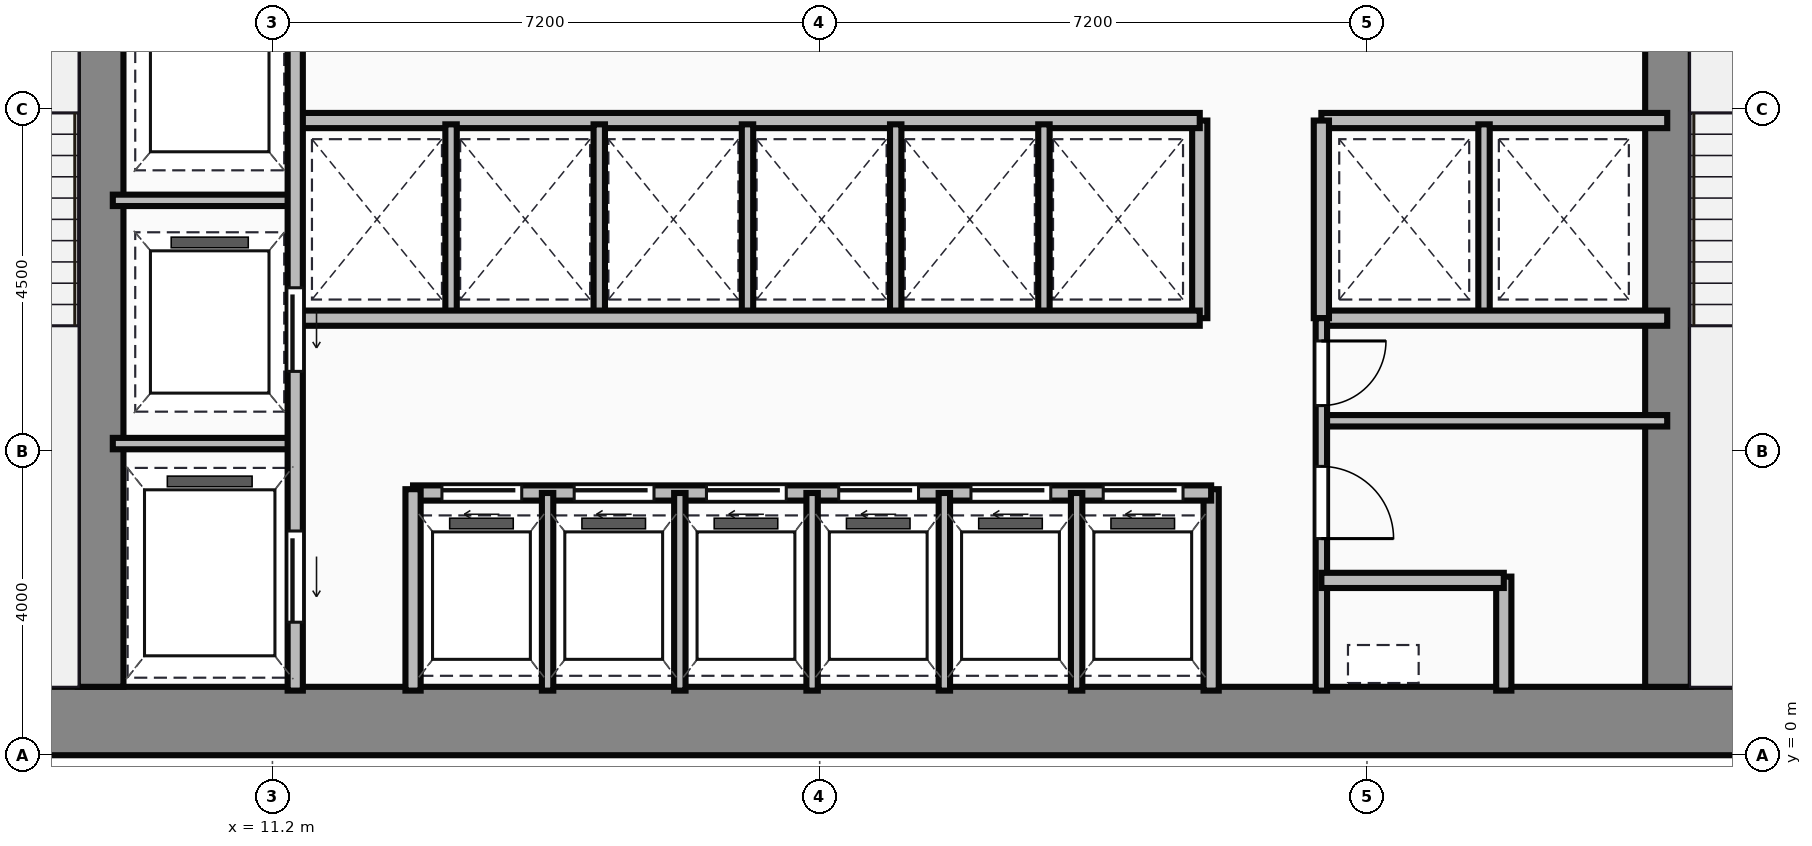
"""IFC4 building model, lengths in metres.
Left out: names, types, materials, properties, quantities, classifications, styles, units other than length and angle.
Written with IfcOpenShell. Run it as: python <this file> out.ifc"""

import sys

from ifc_helpers import new_model, si_unit, direction, frame, frame_2d, origin, place, context, subcontext, project, spatial, rectangle, extrude, source, transform, mapped, element, fill, save


model = new_model("IFC4")
c1 = context("Model", 3, precision=1e-05, world=origin(), true_north=direction((0.0, 1.0)))
c2 = subcontext(c1, "Body", "Model", "MODEL_VIEW")
j1 = project(units=[si_unit("LENGTHUNIT", "METRE"), si_unit("PLANEANGLEUNIT", "RADIAN")], contexts=[c1])
p1 = place(None, origin())
s1 = spatial("IfcSite", under=j1, at=p1, CompositionType="ELEMENT")
p2 = place(p1, origin())
s2 = spatial("IfcBuilding", under=s1, at=p2, CompositionType="ELEMENT")
p3 = place(p2, frame((0.0, 0.0, 43.45)))
s3 = spatial("IfcBuildingStorey", under=s2, at=p3, CompositionType="ELEMENT", Elevation=43.45)
m1 = source(origin(), c2, "Body", "SweptSolid", [
    extrude(rectangle(XDim=29.5, YDim=0.9, at=frame_2d((14.75, 0.0))), origin(), (0.0, 0.0, 1.0), 3.65),
])
p4 = place(p3, frame((4.5, 0.45, 0.0), z_axis=(0.0, 0.0, 1.0), x_axis=(1.0, 0.0, 0.0)))
e1 = element("IfcWall", 1, at=p4, inside=s3, PredefinedType="SHEAR", context=c2, shape_type="MappedRepresentation", body=[
    mapped(m1, transform((0.0, 0.0, 0.0))),
])
m2 = source(origin(), c2, "Body", "SweptSolid", [
    extrude(rectangle(XDim=12.2, YDim=0.6, at=frame_2d((6.1, 0.0))), origin(), (0.0, 0.0, 1.0), 3.65),
])
for number, where, z_axis, x_axis in (
    (2, (8.94, 0.9, 0.0), (0.0, 0.0, 1.0), (0.0, 1.0, 0.0)),
    (3, (29.56, 0.9, 0.0), (0.0, 0.0, 1.0), (0.0, 1.0, 0.0)),
):
    element("IfcWall", number, at=place(p3, frame(where, z_axis=z_axis, x_axis=x_axis)), inside=s3, PredefinedType="SHEAR", context=c2, shape_type="MappedRepresentation", body=[
        mapped(m2, transform((0.0, 0.0, 0.0))),
    ])
m3 = source(origin(), c2, "Body", "SweptSolid", [
    extrude(rectangle(XDim=9.6, YDim=0.2, at=frame_2d((4.8, 0.0))), origin(), (0.0, 0.0, 1.0), 3.4),
])
p5 = place(p3, frame((11.5, 0.85, 0.0), z_axis=(0.0, 0.0, 1.0), x_axis=(0.0, 1.0, 0.0)))
e4 = element("IfcWall", 4, at=p5, inside=s3, PredefinedType="PARTITIONING", context=c2, shape_type="MappedRepresentation", body=[
    mapped(m3, transform((0.0, 0.0, 0.0))),
])
p6 = place(p5, frame((4.2, 0.0, 0.0)))
e5 = element("IfcOpeningElement", 5, at=p6, cuts=e4, PredefinedType="OPENING", context=c2, shape_type="SweptSolid", body=[
    extrude(rectangle(XDim=1.1, YDim=2.15, at=frame_2d((0.55, 1.075))), frame((0.0, 0.11, 0.0), z_axis=(0.0, -1.0, 0.0), x_axis=(1.0, 0.0, 0.0)), (0.0, 0.0, 1.0), 0.22),
])
p7 = place(p5, frame((0.9, 0.0, 0.0)))
e6 = element("IfcOpeningElement", 6, at=p7, cuts=e4, PredefinedType="OPENING", context=c2, shape_type="SweptSolid", body=[
    extrude(rectangle(XDim=1.2, YDim=2.15, at=frame_2d((0.6, 1.075))), frame((0.0, 0.11, 0.0), z_axis=(0.0, -1.0, 0.0), x_axis=(1.0, 0.0, 0.0)), (0.0, 0.0, 1.0), 0.22),
])
m4 = source(origin(), c2, "Body", "SweptSolid", [
    extrude(rectangle(XDim=2.4, YDim=0.15, at=frame_2d((1.2, 0.0))), origin(), (0.0, 0.0, 1.0), 3.4),
])
for number, where, z_axis, x_axis in (
    (7, (9.1, 4.1, 0.0), (0.0, 0.0, 1.0), (1.0, 0.0, 0.0)),
    (8, (9.1, 7.3, 0.0), (0.0, 0.0, 1.0), (1.0, 0.0, 0.0)),
):
    element("IfcWall", number, at=place(p3, frame(where, z_axis=z_axis, x_axis=x_axis)), inside=s3, PredefinedType="PARTITIONING", context=c2, shape_type="MappedRepresentation", body=[
        mapped(m4, transform((0.0, 0.0, 0.0))),
    ])
m5 = source(origin(), c2, "Body", "SweptSolid", [
    extrude(rectangle(XDim=2.65, YDim=0.2, at=frame_2d((1.325, 0.0))), origin(), (0.0, 0.0, 1.0), 3.4),
])
p8 = place(p3, frame((13.05, 0.85, 0.0), z_axis=(0.0, 0.0, 1.0), x_axis=(0.0, 1.0, 0.0)))
e9 = element("IfcWall", 9, at=p8, inside=s3, PredefinedType="PARTITIONING", context=c2, shape_type="MappedRepresentation", body=[
    mapped(m5, transform((0.0, 0.0, 0.0))),
])
m6 = source(origin(), c2, "Body", "SweptSolid", [
    extrude(rectangle(XDim=10.5, YDim=0.2, at=frame_2d((5.25, 0.0))), origin(), (0.0, 0.0, 1.0), 3.4),
])
p9 = place(p3, frame((13.05, 3.45, 0.0), z_axis=(0.0, 0.0, 1.0), x_axis=(1.0, 0.0, 0.0)))
e10 = element("IfcWall", 10, at=p9, inside=s3, PredefinedType="PARTITIONING", context=c2, shape_type="MappedRepresentation", body=[
    mapped(m6, transform((0.0, 0.0, 0.0))),
])
p10 = place(p9, frame((0.38, 0.0, 0.0)))
e11 = element("IfcOpeningElement", 11, at=p10, cuts=e10, PredefinedType="OPENING", context=c2, shape_type="SweptSolid", body=[
    extrude(rectangle(XDim=1.05, YDim=2.15, at=frame_2d((0.525, 1.075))), frame((0.0, 0.11, 0.0), z_axis=(0.0, -1.0, 0.0), x_axis=(1.0, 0.0, 0.0)), (0.0, 0.0, 1.0), 0.22),
])
p11 = place(p9, frame((2.12, 0.0, 0.0)))
e12 = element("IfcOpeningElement", 12, at=p11, cuts=e10, PredefinedType="OPENING", context=c2, shape_type="SweptSolid", body=[
    extrude(rectangle(XDim=1.05, YDim=2.15, at=frame_2d((0.525, 1.075))), frame((0.0, 0.11, 0.0), z_axis=(0.0, -1.0, 0.0), x_axis=(1.0, 0.0, 0.0)), (0.0, 0.0, 1.0), 0.22),
])
p12 = place(p9, frame((3.86, 0.0, 0.0)))
e13 = element("IfcOpeningElement", 13, at=p12, cuts=e10, PredefinedType="OPENING", context=c2, shape_type="SweptSolid", body=[
    extrude(rectangle(XDim=1.05, YDim=2.15, at=frame_2d((0.525, 1.075))), frame((0.0, 0.11, 0.0), z_axis=(0.0, -1.0, 0.0), x_axis=(1.0, 0.0, 0.0)), (0.0, 0.0, 1.0), 0.22),
])
p13 = place(p9, frame((5.6, 0.0, 0.0)))
e14 = element("IfcOpeningElement", 14, at=p13, cuts=e10, PredefinedType="OPENING", context=c2, shape_type="SweptSolid", body=[
    extrude(rectangle(XDim=1.05, YDim=2.15, at=frame_2d((0.525, 1.075))), frame((0.0, 0.11, 0.0), z_axis=(0.0, -1.0, 0.0), x_axis=(1.0, 0.0, 0.0)), (0.0, 0.0, 1.0), 0.22),
])
p14 = place(p9, frame((7.34, 0.0, 0.0)))
e15 = element("IfcOpeningElement", 15, at=p14, cuts=e10, PredefinedType="OPENING", context=c2, shape_type="SweptSolid", body=[
    extrude(rectangle(XDim=1.05, YDim=2.15, at=frame_2d((0.525, 1.075))), frame((0.0, 0.11, 0.0), z_axis=(0.0, -1.0, 0.0), x_axis=(1.0, 0.0, 0.0)), (0.0, 0.0, 1.0), 0.22),
])
p15 = place(p9, frame((9.08, 0.0, 0.0)))
e16 = element("IfcOpeningElement", 16, at=p15, cuts=e10, PredefinedType="OPENING", context=c2, shape_type="SweptSolid", body=[
    extrude(rectangle(XDim=1.05, YDim=2.15, at=frame_2d((0.525, 1.075))), frame((0.0, 0.11, 0.0), z_axis=(0.0, -1.0, 0.0), x_axis=(1.0, 0.0, 0.0)), (0.0, 0.0, 1.0), 0.22),
])
p16 = place(p3, frame((23.55, 0.85, 0.0), z_axis=(0.0, 0.0, 1.0), x_axis=(0.0, 1.0, 0.0)))
e17 = element("IfcWall", 17, at=p16, inside=s3, PredefinedType="PARTITIONING", context=c2, shape_type="MappedRepresentation", body=[
    mapped(m5, transform((0.0, 0.0, 0.0))),
])
m7 = source(origin(), c2, "Body", "SweptSolid", [
    extrude(rectangle(XDim=2.6, YDim=0.15, at=frame_2d((1.3, 0.0))), origin(), (0.0, 0.0, 1.0), 3.4),
])
for number, where, z_axis, x_axis in (
    (18, (14.82, 0.85, 0.0), (0.0, 0.0, 1.0), (0.0, 1.0, 0.0)),
    (19, (16.56, 0.85, 0.0), (0.0, 0.0, 1.0), (0.0, 1.0, 0.0)),
    (20, (18.3, 0.85, 0.0), (0.0, 0.0, 1.0), (0.0, 1.0, 0.0)),
    (21, (20.04, 0.85, 0.0), (0.0, 0.0, 1.0), (0.0, 1.0, 0.0)),
    (22, (21.78, 0.85, 0.0), (0.0, 0.0, 1.0), (0.0, 1.0, 0.0)),
):
    element("IfcWall", number, at=place(p3, frame(where, z_axis=z_axis, x_axis=x_axis)), inside=s3, PredefinedType="PARTITIONING", context=c2, shape_type="MappedRepresentation", body=[
        mapped(m7, transform((0.0, 0.0, 0.0))),
    ])
m8 = source(origin(), c2, "Body", "SweptSolid", [
    extrude(rectangle(XDim=11.85, YDim=0.2, at=frame_2d((5.925, 0.0))), origin(), (0.0, 0.0, 1.0), 3.4),
])
for number, where, z_axis, x_axis in (
    (23, (11.55, 5.75, 0.0), (0.0, 0.0, 1.0), (1.0, 0.0, 0.0)),
    (24, (11.55, 8.35, 0.0), (0.0, 0.0, 1.0), (1.0, 0.0, 0.0)),
):
    element("IfcWall", number, at=place(p3, frame(where, z_axis=z_axis, x_axis=x_axis)), inside=s3, PredefinedType="PARTITIONING", context=c2, shape_type="MappedRepresentation", body=[
        mapped(m8, transform((0.0, 0.0, 0.0))),
    ])
m9 = source(origin(), c2, "Body", "SweptSolid", [
    extrude(rectangle(XDim=2.6, YDim=0.2, at=frame_2d((1.3, 0.0))), origin(), (0.0, 0.0, 1.0), 3.4),
])
p17 = place(p3, frame((23.4, 5.75, 0.0), z_axis=(0.0, 0.0, 1.0), x_axis=(0.0, 1.0, 0.0)))
e25 = element("IfcWall", 25, at=p17, inside=s3, PredefinedType="PARTITIONING", context=c2, shape_type="MappedRepresentation", body=[
    mapped(m9, transform((0.0, 0.0, 0.0))),
])
m10 = source(origin(), c2, "Body", "SweptSolid", [
    extrude(rectangle(XDim=2.5, YDim=0.15, at=frame_2d((1.25, 0.0))), origin(), (0.0, 0.0, 1.0), 3.4),
])
for number, where, z_axis, x_axis in (
    (26, (13.55, 5.8, 0.0), (0.0, 0.0, 1.0), (0.0, 1.0, 0.0)),
    (27, (15.5, 5.8, 0.0), (0.0, 0.0, 1.0), (0.0, 1.0, 0.0)),
    (28, (17.45, 5.8, 0.0), (0.0, 0.0, 1.0), (0.0, 1.0, 0.0)),
    (29, (19.4, 5.8, 0.0), (0.0, 0.0, 1.0), (0.0, 1.0, 0.0)),
    (30, (21.35, 5.8, 0.0), (0.0, 0.0, 1.0), (0.0, 1.0, 0.0)),
):
    element("IfcWall", number, at=place(p3, frame(where, z_axis=z_axis, x_axis=x_axis)), inside=s3, PredefinedType="PARTITIONING", context=c2, shape_type="MappedRepresentation", body=[
        mapped(m10, transform((0.0, 0.0, 0.0))),
    ])
m11 = source(origin(), c2, "Body", "SweptSolid", [
    extrude(rectangle(XDim=4.55, YDim=0.2, at=frame_2d((2.275, 0.0))), origin(), (0.0, 0.0, 1.0), 3.4),
])
for number, where, z_axis, x_axis in (
    (31, (25.0, 8.35, 0.0), (0.0, 0.0, 1.0), (1.0, 0.0, 0.0)),
    (32, (25.0, 5.75, 0.0), (0.0, 0.0, 1.0), (1.0, 0.0, 0.0)),
):
    element("IfcWall", number, at=place(p3, frame(where, z_axis=z_axis, x_axis=x_axis)), inside=s3, PredefinedType="PARTITIONING", context=c2, shape_type="MappedRepresentation", body=[
        mapped(m11, transform((0.0, 0.0, 0.0))),
    ])
p18 = place(p3, frame((25.0, 5.75, 0.0), z_axis=(0.0, 0.0, 1.0), x_axis=(0.0, 1.0, 0.0)))
e33 = element("IfcWall", 33, at=p18, inside=s3, PredefinedType="PARTITIONING", context=c2, shape_type="MappedRepresentation", body=[
    mapped(m9, transform((0.0, 0.0, 0.0))),
])
p19 = place(p3, frame((27.14, 5.8, 0.0), z_axis=(0.0, 0.0, 1.0), x_axis=(0.0, 1.0, 0.0)))
e34 = element("IfcWall", 34, at=p19, inside=s3, PredefinedType="PARTITIONING", context=c2, shape_type="MappedRepresentation", body=[
    mapped(m10, transform((0.0, 0.0, 0.0))),
])
m12 = source(origin(), c2, "Body", "SweptSolid", [
    extrude(rectangle(XDim=4.9, YDim=0.15, at=frame_2d((2.45, 0.0))), origin(), (0.0, 0.0, 1.0), 3.4),
])
p20 = place(p3, frame((25.0, 0.85, 0.0), z_axis=(0.0, 0.0, 1.0), x_axis=(0.0, 1.0, 0.0)))
e35 = element("IfcWall", 35, at=p20, inside=s3, PredefinedType="PARTITIONING", context=c2, shape_type="MappedRepresentation", body=[
    mapped(m12, transform((0.0, 0.0, 0.0))),
])
p21 = place(p20, frame((2.0, 0.0, 0.0)))
e36 = element("IfcOpeningElement", 36, at=p21, cuts=e35, PredefinedType="OPENING", context=c2, shape_type="SweptSolid", body=[
    extrude(rectangle(XDim=0.95, YDim=2.15, at=frame_2d((0.475, 1.075))), frame((0.0, 0.085, 0.0), z_axis=(0.0, -1.0, 0.0), x_axis=(1.0, 0.0, 0.0)), (0.0, 0.0, 1.0), 0.17),
])
p22 = place(p20, frame((3.75, 0.0, 0.0)))
e37 = element("IfcOpeningElement", 37, at=p22, cuts=e35, PredefinedType="OPENING", context=c2, shape_type="SweptSolid", body=[
    extrude(rectangle(XDim=0.85, YDim=2.15, at=frame_2d((0.425, 1.075))), frame((0.0, 0.085, 0.0), z_axis=(0.0, -1.0, 0.0), x_axis=(1.0, 0.0, 0.0)), (0.0, 0.0, 1.0), 0.17),
])
m13 = source(origin(), c2, "Body", "SweptSolid", [
    extrude(rectangle(XDim=2.4, YDim=0.2, at=frame_2d((1.2, 0.0))), origin(), (0.0, 0.0, 1.0), 3.4),
])
p23 = place(p3, frame((25.0, 2.3, 0.0), z_axis=(0.0, 0.0, 1.0), x_axis=(1.0, 0.0, 0.0)))
e38 = element("IfcWall", 38, at=p23, inside=s3, PredefinedType="PARTITIONING", context=c2, shape_type="MappedRepresentation", body=[
    mapped(m13, transform((0.0, 0.0, 0.0))),
])
m14 = source(origin(), c2, "Body", "SweptSolid", [
    extrude(rectangle(XDim=1.5, YDim=0.2, at=frame_2d((0.75, 0.0))), origin(), (0.0, 0.0, 1.0), 3.4),
])
p24 = place(p3, frame((27.4, 0.85, 0.0), z_axis=(0.0, 0.0, 1.0), x_axis=(0.0, 1.0, 0.0)))
e39 = element("IfcWall", 39, at=p24, inside=s3, PredefinedType="PARTITIONING", context=c2, shape_type="MappedRepresentation", body=[
    mapped(m14, transform((0.0, 0.0, 0.0))),
])
m15 = source(origin(), c2, "Body", "SweptSolid", [
    extrude(rectangle(XDim=4.55, YDim=0.15, at=frame_2d((2.275, 0.0))), origin(), (0.0, 0.0, 1.0), 3.4),
])
p25 = place(p3, frame((25.0, 4.4, 0.0), z_axis=(0.0, 0.0, 1.0), x_axis=(1.0, 0.0, 0.0)))
e40 = element("IfcWall", 40, at=p25, inside=s3, PredefinedType="PARTITIONING", context=c2, shape_type="MappedRepresentation", body=[
    mapped(m15, transform((0.0, 0.0, 0.0))),
])
m16 = source(origin(), c2, "Body", "SweptSolid", [
    extrude(rectangle(XDim=1.1, YDim=2.15, at=frame_2d((0.55, 1.075))), frame((0.0, 0.025, 0.0), z_axis=(0.0, -1.0, 0.0), x_axis=(1.0, 0.0, 0.0)), (0.0, 0.0, 1.0), 0.05),
])
p26 = place(p6, frame((1.1, 0.0, 0.0), z_axis=(0.0, 0.0, 1.0), x_axis=(-1.0, 0.0, 0.0)))
e41 = element("IfcDoor", 41, at=p26, inside=s3, OperationType="SLIDING_TO_LEFT", PredefinedType="DOOR", context=c2, shape_type="MappedRepresentation", body=[
    mapped(m16, transform((0.0, 0.0, 0.0))),
])
fill(e5, e41)
m17 = source(origin(), c2, "Body", "SweptSolid", [
    extrude(rectangle(XDim=1.2, YDim=2.15, at=frame_2d((0.6, 1.075))), frame((0.0, 0.025, 0.0), z_axis=(0.0, -1.0, 0.0), x_axis=(1.0, 0.0, 0.0)), (0.0, 0.0, 1.0), 0.05),
])
p27 = place(p7, frame((1.2, 0.0, 0.0), z_axis=(0.0, 0.0, 1.0), x_axis=(-1.0, 0.0, 0.0)))
e42 = element("IfcDoor", 42, at=p27, inside=s3, OperationType="SLIDING_TO_LEFT", PredefinedType="DOOR", context=c2, shape_type="MappedRepresentation", body=[
    mapped(m17, transform((0.0, 0.0, 0.0))),
])
fill(e6, e42)
m18 = source(origin(), c2, "Body", "SweptSolid", [
    extrude(rectangle(XDim=1.05, YDim=2.15, at=frame_2d((0.525, 1.075))), frame((0.0, 0.025, 0.0), z_axis=(0.0, -1.0, 0.0), x_axis=(1.0, 0.0, 0.0)), (0.0, 0.0, 1.0), 0.05),
])
p28 = place(p10, origin())
e43 = element("IfcDoor", 43, at=p28, inside=s3, OperationType="SLIDING_TO_LEFT", PredefinedType="DOOR", context=c2, shape_type="MappedRepresentation", body=[
    mapped(m18, transform((0.0, 0.0, 0.0))),
])
fill(e11, e43)
p29 = place(p11, origin())
e44 = element("IfcDoor", 44, at=p29, inside=s3, OperationType="SLIDING_TO_LEFT", PredefinedType="DOOR", context=c2, shape_type="MappedRepresentation", body=[
    mapped(m18, transform((0.0, 0.0, 0.0))),
])
fill(e12, e44)
p30 = place(p12, origin())
e45 = element("IfcDoor", 45, at=p30, inside=s3, OperationType="SLIDING_TO_LEFT", PredefinedType="DOOR", context=c2, shape_type="MappedRepresentation", body=[
    mapped(m18, transform((0.0, 0.0, 0.0))),
])
fill(e13, e45)
p31 = place(p13, origin())
e46 = element("IfcDoor", 46, at=p31, inside=s3, OperationType="SLIDING_TO_LEFT", PredefinedType="DOOR", context=c2, shape_type="MappedRepresentation", body=[
    mapped(m18, transform((0.0, 0.0, 0.0))),
])
fill(e14, e46)
p32 = place(p14, origin())
e47 = element("IfcDoor", 47, at=p32, inside=s3, OperationType="SLIDING_TO_LEFT", PredefinedType="DOOR", context=c2, shape_type="MappedRepresentation", body=[
    mapped(m18, transform((0.0, 0.0, 0.0))),
])
fill(e15, e47)
p33 = place(p15, origin())
e48 = element("IfcDoor", 48, at=p33, inside=s3, OperationType="SLIDING_TO_LEFT", PredefinedType="DOOR", context=c2, shape_type="MappedRepresentation", body=[
    mapped(m18, transform((0.0, 0.0, 0.0))),
])
fill(e16, e48)
m19 = source(origin(), c2, "Body", "SweptSolid", [
    extrude(rectangle(XDim=0.95, YDim=2.15, at=frame_2d((0.475, 1.075))), frame((0.0, 0.025, 0.0), z_axis=(0.0, -1.0, 0.0), x_axis=(1.0, 0.0, 0.0)), (0.0, 0.0, 1.0), 0.05),
])
p34 = place(p21, origin())
e49 = element("IfcDoor", 49, at=p34, inside=s3, OperationType="SINGLE_SWING_LEFT", PredefinedType="DOOR", context=c2, shape_type="MappedRepresentation", body=[
    mapped(m19, transform((0.0, 0.0, 0.0))),
])
fill(e36, e49)
m20 = source(origin(), c2, "Body", "SweptSolid", [
    extrude(rectangle(XDim=0.85, YDim=2.15, at=frame_2d((0.425, 1.075))), frame((0.0, 0.025, 0.0), z_axis=(0.0, -1.0, 0.0), x_axis=(1.0, 0.0, 0.0)), (0.0, 0.0, 1.0), 0.05),
])
p35 = place(p22, origin())
e50 = element("IfcDoor", 50, at=p35, inside=s3, OperationType="SINGLE_SWING_RIGHT", PredefinedType="DOOR", context=c2, shape_type="MappedRepresentation", body=[
    mapped(m20, transform((0.0, 0.0, 0.0))),
])
fill(e37, e50)
save(model, sys.argv[1])
